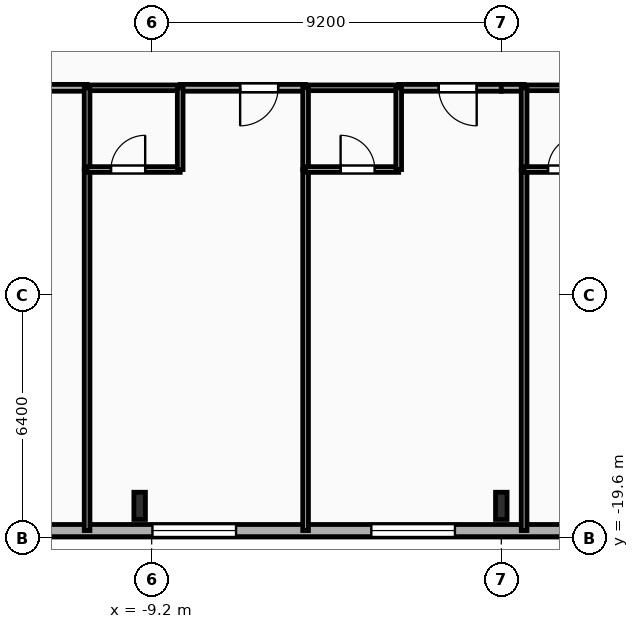
"""IFC4 building model, lengths in metres.
Left out: names, types, materials, properties, quantities, classifications, styles, units other than length and angle.
Written with IfcOpenShell. Run it as: python <this file> out.ifc"""

import sys

from ifc_helpers import new_model, si_unit, direction, frame, frame_2d, origin, origin_2d, place, context, subcontext, project, spatial, rectangle, i_section, extrude, element, fill, save


model = new_model("IFC4")
c1 = context("Model", 3, precision=1e-05, world=origin(), true_north=direction((0.0, 1.0)))
c2 = subcontext(c1, "Body", "Model", "MODEL_VIEW")
j1 = project(units=[si_unit("LENGTHUNIT", "METRE"), si_unit("PLANEANGLEUNIT", "RADIAN")], contexts=[c1])
p1 = place(None, origin())
s1 = spatial("IfcSite", under=j1, at=p1, CompositionType="ELEMENT")
p2 = place(p1, origin())
s2 = spatial("IfcBuilding", under=s1, at=p2, CompositionType="ELEMENT")
p3 = place(p2, frame((0.0, 0.0, 67.2)))
s3 = spatial("IfcBuildingStorey", under=s2, at=p3, CompositionType="ELEMENT", Elevation=67.2)
for number, where, z_axis, x_axis in (
    (1, (-9.517, -18.75, 0.0), (0.0, 0.0, 1.0), (1.0, 0.0, 0.0)),
    (2, (0.0, -18.75, 0.0), (0.0, 0.0, 1.0), (1.0, 0.0, 0.0)),
):
    element("IfcColumn", number, at=place(p3, frame(where, z_axis=z_axis, x_axis=x_axis)), inside=s3, PredefinedType="COLUMN", context=c2, shape_type="SweptSolid", body=[
        extrude(i_section(OverallWidth=0.304, OverallDepth=0.716, WebThickness=0.021, FlangeThickness=0.04, FilletRadius=0.027, at=origin_2d()), origin(), (0.0, 0.0, 1.0), 3.35),
    ])
p4 = place(p3, frame((29.2, -19.4, 0.0), z_axis=(0.0, 0.0, 1.0), x_axis=(-1.0, 0.0, 0.0)))
e3 = element("IfcWall", 3, at=p4, inside=s3, PredefinedType="SOLIDWALL", context=c2, shape_type="SweptSolid", body=[
    extrude(rectangle(XDim=58.4, YDim=0.32, at=frame_2d((29.2, 0.0))), origin(), (0.0, 0.0, 1.0), 3.035),
])
p5 = place(p4, frame((2.535, 0.0, 0.85)))
e4 = element("IfcOpeningElement", 4, at=p5, cuts=e3, PredefinedType="OPENING", context=c2, shape_type="SweptSolid", body=[
    extrude(rectangle(XDim=1.65, YDim=1.85, at=frame_2d((0.825, 0.925))), frame((0.0, 0.17, 0.0), z_axis=(0.0, -1.0, 0.0), x_axis=(1.0, 0.0, 0.0)), (0.0, 0.0, 1.0), 0.34),
])
p6 = place(p4, frame((7.975, 0.0, 0.85)))
e5 = element("IfcOpeningElement", 5, at=p6, cuts=e3, PredefinedType="OPENING", context=c2, shape_type="SweptSolid", body=[
    extrude(rectangle(XDim=1.65, YDim=1.85, at=frame_2d((0.825, 0.925))), frame((0.0, 0.17, 0.0), z_axis=(0.0, -1.0, 0.0), x_axis=(1.0, 0.0, 0.0)), (0.0, 0.0, 1.0), 0.34),
])
p7 = place(p4, frame((13.14, 0.0, 0.85)))
e6 = element("IfcOpeningElement", 6, at=p7, cuts=e3, PredefinedType="OPENING", context=c2, shape_type="SweptSolid", body=[
    extrude(rectangle(XDim=2.2, YDim=1.85, at=frame_2d((1.1, 0.925))), frame((0.0, 0.17, 0.0), z_axis=(0.0, -1.0, 0.0), x_axis=(1.0, 0.0, 0.0)), (0.0, 0.0, 1.0), 0.34),
])
p8 = place(p4, frame((19.992, 0.0, 0.85)))
e7 = element("IfcOpeningElement", 7, at=p8, cuts=e3, PredefinedType="OPENING", context=c2, shape_type="SweptSolid", body=[
    extrude(rectangle(XDim=2.2, YDim=1.85, at=frame_2d((1.1, 0.925))), frame((0.0, 0.17, 0.0), z_axis=(0.0, -1.0, 0.0), x_axis=(1.0, 0.0, 0.0)), (0.0, 0.0, 1.0), 0.34),
])
p9 = place(p4, frame((24.66, 0.0, 0.85)))
e8 = element("IfcOpeningElement", 8, at=p9, cuts=e3, PredefinedType="OPENING", context=c2, shape_type="SweptSolid", body=[
    extrude(rectangle(XDim=2.2, YDim=1.85, at=frame_2d((1.1, 0.925))), frame((0.0, 0.17, 0.0), z_axis=(0.0, -1.0, 0.0), x_axis=(1.0, 0.0, 0.0)), (0.0, 0.0, 1.0), 0.34),
])
p10 = place(p4, frame((30.42, 0.0, 0.85)))
e9 = element("IfcOpeningElement", 9, at=p10, cuts=e3, PredefinedType="OPENING", context=c2, shape_type="SweptSolid", body=[
    extrude(rectangle(XDim=2.2, YDim=1.85, at=frame_2d((1.1, 0.925))), frame((0.0, 0.17, 0.0), z_axis=(0.0, -1.0, 0.0), x_axis=(1.0, 0.0, 0.0)), (0.0, 0.0, 1.0), 0.34),
])
p11 = place(p4, frame((36.18, 0.0, 0.85)))
e10 = element("IfcOpeningElement", 10, at=p11, cuts=e3, PredefinedType="OPENING", context=c2, shape_type="SweptSolid", body=[
    extrude(rectangle(XDim=2.2, YDim=1.85, at=frame_2d((1.1, 0.925))), frame((0.0, 0.17, 0.0), z_axis=(0.0, -1.0, 0.0), x_axis=(1.0, 0.0, 0.0)), (0.0, 0.0, 1.0), 0.34),
])
p12 = place(p4, frame((41.94, 0.0, 0.85)))
e11 = element("IfcOpeningElement", 11, at=p12, cuts=e3, PredefinedType="OPENING", context=c2, shape_type="SweptSolid", body=[
    extrude(rectangle(XDim=2.2, YDim=1.85, at=frame_2d((1.1, 0.925))), frame((0.0, 0.17, 0.0), z_axis=(0.0, -1.0, 0.0), x_axis=(1.0, 0.0, 0.0)), (0.0, 0.0, 1.0), 0.34),
])
p13 = place(p4, frame((48.821, 0.0, 0.85)))
e12 = element("IfcOpeningElement", 12, at=p13, cuts=e3, PredefinedType="OPENING", context=c2, shape_type="SweptSolid", body=[
    extrude(rectangle(XDim=1.65, YDim=1.85, at=frame_2d((0.825, 0.925))), frame((0.0, 0.17, 0.0), z_axis=(0.0, -1.0, 0.0), x_axis=(1.0, 0.0, 0.0)), (0.0, 0.0, 1.0), 0.34),
])
p14 = place(p4, frame((53.775, 0.0, 0.85)))
e13 = element("IfcOpeningElement", 13, at=p14, cuts=e3, PredefinedType="OPENING", context=c2, shape_type="SweptSolid", body=[
    extrude(rectangle(XDim=1.65, YDim=1.85, at=frame_2d((0.825, 0.925))), frame((0.0, 0.17, 0.0), z_axis=(0.0, -1.0, 0.0), x_axis=(1.0, 0.0, 0.0)), (0.0, 0.0, 1.0), 0.34),
])
p15 = place(p3, frame((-10.9, -7.75, 0.0), z_axis=(0.0, 0.0, 1.0), x_axis=(-1.0, 0.0, 0.0)))
e14 = element("IfcWall", 14, at=p15, inside=s3, PredefinedType="PARTITIONING", context=c2, shape_type="SweptSolid", body=[
    extrude(rectangle(XDim=3.3, YDim=0.18, at=frame_2d((1.65, 0.0))), origin(), (0.0, 0.0, 1.0), 3.035),
])
p16 = place(p15, frame((1.577, 0.0, 0.0)))
e15 = element("IfcOpeningElement", 15, at=p16, cuts=e14, PredefinedType="OPENING", context=c2, shape_type="SweptSolid", body=[
    extrude(rectangle(XDim=1.0, YDim=2.15, at=frame_2d((0.5, 1.075))), frame((0.0, 0.1, 0.0), z_axis=(0.0, -1.0, 0.0), x_axis=(1.0, 0.0, 0.0)), (0.0, 0.0, 1.0), 0.2),
])
p17 = place(p3, frame((-5.15, -7.75, 0.0), z_axis=(0.0, 0.0, 1.0), x_axis=(-1.0, 0.0, 0.0)))
e16 = element("IfcWall", 16, at=p17, inside=s3, PredefinedType="PARTITIONING", context=c2, shape_type="SweptSolid", body=[
    extrude(rectangle(XDim=3.3, YDim=0.18, at=frame_2d((1.65, 0.0))), origin(), (0.0, 0.0, 1.0), 3.035),
])
p18 = place(p17, frame((0.722, 0.0, 0.0)))
e17 = element("IfcOpeningElement", 17, at=p18, cuts=e16, PredefinedType="OPENING", context=c2, shape_type="SweptSolid", body=[
    extrude(rectangle(XDim=1.0, YDim=2.15, at=frame_2d((0.5, 1.075))), frame((0.0, 0.1, 0.0), z_axis=(0.0, -1.0, 0.0), x_axis=(1.0, 0.0, 0.0)), (0.0, 0.0, 1.0), 0.2),
])
p19 = place(p3, frame((-8.45, -7.75, 0.0), z_axis=(0.0, 0.0, 1.0), x_axis=(-1.0, 0.0, 0.0)))
e18 = element("IfcWall", 18, at=p19, inside=s3, PredefinedType="PLUMBINGWALL", context=c2, shape_type="SweptSolid", body=[
    extrude(rectangle(XDim=2.45, YDim=0.15, at=frame_2d((1.225, 0.0))), origin(), (0.0, 0.0, 1.0), 3.035),
])
p20 = place(p3, frame((0.0, -7.75, 0.0), z_axis=(0.0, 0.0, 1.0), x_axis=(-1.0, 0.0, 0.0)))
e19 = element("IfcWall", 19, at=p20, inside=s3, PredefinedType="PARTITIONING", context=c2, shape_type="SweptSolid", body=[
    extrude(rectangle(XDim=2.7, YDim=0.18, at=frame_2d((1.35, 0.0))), origin(), (0.0, 0.0, 1.0), 3.035),
])
p21 = place(p20, frame((0.647, 0.0, 0.0)))
e20 = element("IfcOpeningElement", 20, at=p21, cuts=e19, PredefinedType="OPENING", context=c2, shape_type="SweptSolid", body=[
    extrude(rectangle(XDim=1.0, YDim=2.15, at=frame_2d((0.5, 1.075))), frame((0.0, 0.1, 0.0), z_axis=(0.0, -1.0, 0.0), x_axis=(1.0, 0.0, 0.0)), (0.0, 0.0, 1.0), 0.2),
])
p22 = place(p3, frame((-2.7, -7.75, 0.0), z_axis=(0.0, 0.0, 1.0), x_axis=(-1.0, 0.0, 0.0)))
e21 = element("IfcWall", 21, at=p22, inside=s3, PredefinedType="PLUMBINGWALL", context=c2, shape_type="SweptSolid", body=[
    extrude(rectangle(XDim=2.45, YDim=0.15, at=frame_2d((1.225, 0.0))), origin(), (0.0, 0.0, 1.0), 3.035),
])
p23 = place(p3, frame((0.6, -7.75, 0.0), z_axis=(0.0, 0.0, 1.0), x_axis=(-1.0, 0.0, 0.0)))
e22 = element("IfcWall", 22, at=p23, inside=s3, PredefinedType="PARTITIONING", context=c2, shape_type="SweptSolid", body=[
    extrude(rectangle(XDim=0.6, YDim=0.18, at=frame_2d((0.3, 0.0))), origin(), (0.0, 0.0, 1.0), 3.035),
])
p24 = place(p3, frame((3.05, -7.75, 0.0), z_axis=(0.0, 0.0, 1.0), x_axis=(-1.0, 0.0, 0.0)))
e23 = element("IfcWall", 23, at=p24, inside=s3, PredefinedType="PLUMBINGWALL", context=c2, shape_type="SweptSolid", body=[
    extrude(rectangle(XDim=2.45, YDim=0.15, at=frame_2d((1.225, 0.0))), origin(), (0.0, 0.0, 1.0), 3.035),
])
p25 = place(p3, frame((-10.9, -9.9, 0.0), z_axis=(0.0, 0.0, 1.0), x_axis=(0.0, -1.0, 0.0)))
e24 = element("IfcWall", 24, at=p25, inside=s3, PredefinedType="PARTITIONING", context=c2, shape_type="SweptSolid", body=[
    extrude(rectangle(XDim=9.5, YDim=0.15, at=frame_2d((4.75, 0.0))), origin(), (0.0, 0.0, 1.0), 3.035),
])
p26 = place(p3, frame((-10.9, -7.75, 0.0), z_axis=(0.0, 0.0, 1.0), x_axis=(0.0, -1.0, 0.0)))
e25 = element("IfcWall", 25, at=p26, inside=s3, PredefinedType="PLUMBINGWALL", context=c2, shape_type="SweptSolid", body=[
    extrude(rectangle(XDim=2.15, YDim=0.15, at=frame_2d((1.075, 0.0))), origin(), (0.0, 0.0, 1.0), 3.035),
])
p27 = place(p3, frame((-10.9, -9.9, 0.0), z_axis=(0.0, 0.0, 1.0), x_axis=(1.0, 0.0, 0.0)))
e26 = element("IfcWall", 26, at=p27, inside=s3, PredefinedType="PLUMBINGWALL", context=c2, shape_type="SweptSolid", body=[
    extrude(rectangle(XDim=2.45, YDim=0.15, at=frame_2d((1.225, 0.0))), origin(), (0.0, 0.0, 1.0), 3.035),
])
p28 = place(p27, frame((0.629, 0.0, 0.0)))
e27 = element("IfcOpeningElement", 27, at=p28, cuts=e26, PredefinedType="OPENING", context=c2, shape_type="SweptSolid", body=[
    extrude(rectangle(XDim=0.9, YDim=2.1, at=frame_2d((0.45, 1.05))), frame((0.0, 0.085, 0.0), z_axis=(0.0, -1.0, 0.0), x_axis=(1.0, 0.0, 0.0)), (0.0, 0.0, 1.0), 0.17),
])
p29 = place(p3, frame((-8.45, -9.9, 0.0), z_axis=(0.0, 0.0, 1.0), x_axis=(0.0, 1.0, 0.0)))
e28 = element("IfcWall", 28, at=p29, inside=s3, PredefinedType="PLUMBINGWALL", context=c2, shape_type="SweptSolid", body=[
    extrude(rectangle(XDim=2.15, YDim=0.15, at=frame_2d((1.075, 0.0))), origin(), (0.0, 0.0, 1.0), 3.035),
])
p30 = place(p3, frame((-5.15, -9.9, 0.0), z_axis=(0.0, 0.0, 1.0), x_axis=(0.0, -1.0, 0.0)))
e29 = element("IfcWall", 29, at=p30, inside=s3, PredefinedType="PARTITIONING", context=c2, shape_type="SweptSolid", body=[
    extrude(rectangle(XDim=9.5, YDim=0.15, at=frame_2d((4.75, 0.0))), origin(), (0.0, 0.0, 1.0), 3.035),
])
p31 = place(p3, frame((-5.15, -7.75, 0.0), z_axis=(0.0, 0.0, 1.0), x_axis=(0.0, -1.0, 0.0)))
e30 = element("IfcWall", 30, at=p31, inside=s3, PredefinedType="PLUMBINGWALL", context=c2, shape_type="SweptSolid", body=[
    extrude(rectangle(XDim=2.15, YDim=0.15, at=frame_2d((1.075, 0.0))), origin(), (0.0, 0.0, 1.0), 3.035),
])
p32 = place(p3, frame((-5.15, -9.9, 0.0), z_axis=(0.0, 0.0, 1.0), x_axis=(1.0, 0.0, 0.0)))
e31 = element("IfcWall", 31, at=p32, inside=s3, PredefinedType="PLUMBINGWALL", context=c2, shape_type="SweptSolid", body=[
    extrude(rectangle(XDim=2.45, YDim=0.15, at=frame_2d((1.225, 0.0))), origin(), (0.0, 0.0, 1.0), 3.035),
])
p33 = place(p32, frame((0.921, 0.0, 0.0)))
e32 = element("IfcOpeningElement", 32, at=p33, cuts=e31, PredefinedType="OPENING", context=c2, shape_type="SweptSolid", body=[
    extrude(rectangle(XDim=0.9, YDim=2.1, at=frame_2d((0.45, 1.05))), frame((0.0, 0.085, 0.0), z_axis=(0.0, -1.0, 0.0), x_axis=(1.0, 0.0, 0.0)), (0.0, 0.0, 1.0), 0.17),
])
p34 = place(p3, frame((-2.7, -9.9, 0.0), z_axis=(0.0, 0.0, 1.0), x_axis=(0.0, 1.0, 0.0)))
e33 = element("IfcWall", 33, at=p34, inside=s3, PredefinedType="PLUMBINGWALL", context=c2, shape_type="SweptSolid", body=[
    extrude(rectangle(XDim=2.15, YDim=0.15, at=frame_2d((1.075, 0.0))), origin(), (0.0, 0.0, 1.0), 3.035),
])
p35 = place(p3, frame((0.6, -9.9, 0.0), z_axis=(0.0, 0.0, 1.0), x_axis=(0.0, -1.0, 0.0)))
e34 = element("IfcWall", 34, at=p35, inside=s3, PredefinedType="PARTITIONING", context=c2, shape_type="SweptSolid", body=[
    extrude(rectangle(XDim=9.5, YDim=0.15, at=frame_2d((4.75, 0.0))), origin(), (0.0, 0.0, 1.0), 3.035),
])
p36 = place(p3, frame((0.6, -7.75, 0.0), z_axis=(0.0, 0.0, 1.0), x_axis=(0.0, -1.0, 0.0)))
e35 = element("IfcWall", 35, at=p36, inside=s3, PredefinedType="PLUMBINGWALL", context=c2, shape_type="SweptSolid", body=[
    extrude(rectangle(XDim=2.15, YDim=0.15, at=frame_2d((1.075, 0.0))), origin(), (0.0, 0.0, 1.0), 3.035),
])
p37 = place(p3, frame((0.6, -9.9, 0.0), z_axis=(0.0, 0.0, 1.0), x_axis=(1.0, 0.0, 0.0)))
e36 = element("IfcWall", 36, at=p37, inside=s3, PredefinedType="PLUMBINGWALL", context=c2, shape_type="SweptSolid", body=[
    extrude(rectangle(XDim=2.45, YDim=0.15, at=frame_2d((1.225, 0.0))), origin(), (0.0, 0.0, 1.0), 3.035),
])
p38 = place(p37, frame((0.629, 0.0, 0.0)))
e37 = element("IfcOpeningElement", 37, at=p38, cuts=e36, PredefinedType="OPENING", context=c2, shape_type="SweptSolid", body=[
    extrude(rectangle(XDim=0.9, YDim=2.1, at=frame_2d((0.45, 1.05))), frame((0.0, 0.085, 0.0), z_axis=(0.0, -1.0, 0.0), x_axis=(1.0, 0.0, 0.0)), (0.0, 0.0, 1.0), 0.17),
])
p39 = place(p10, origin())
e38 = element("IfcWindow", 38, at=p39, inside=s3, PartitioningType="SINGLE_PANEL", PredefinedType="WINDOW", context=c2, shape_type="SweptSolid", body=[
    extrude(rectangle(XDim=2.2, YDim=1.85, at=frame_2d((1.1, 0.925))), frame((0.0, 0.03, 0.0), z_axis=(0.0, -1.0, 0.0), x_axis=(1.0, 0.0, 0.0)), (0.0, 0.0, 1.0), 0.06),
])
fill(e9, e38)
p40 = place(p11, origin())
e39 = element("IfcWindow", 39, at=p40, inside=s3, PartitioningType="SINGLE_PANEL", PredefinedType="WINDOW", context=c2, shape_type="SweptSolid", body=[
    extrude(rectangle(XDim=2.2, YDim=1.85, at=frame_2d((1.1, 0.925))), frame((0.0, 0.03, 0.0), z_axis=(0.0, -1.0, 0.0), x_axis=(1.0, 0.0, 0.0)), (0.0, 0.0, 1.0), 0.06),
])
fill(e10, e39)
p41 = place(p18, origin())
e40 = element("IfcDoor", 40, at=p41, inside=s3, OperationType="SINGLE_SWING_RIGHT", PredefinedType="DOOR", context=c2, shape_type="SweptSolid", body=[
    extrude(rectangle(XDim=1.0, YDim=2.15, at=frame_2d((0.5, 1.075))), frame((0.0, 0.025, 0.0), z_axis=(0.0, -1.0, 0.0), x_axis=(1.0, 0.0, 0.0)), (0.0, 0.0, 1.0), 0.05),
])
fill(e17, e40)
p42 = place(p21, origin())
e41 = element("IfcDoor", 41, at=p42, inside=s3, OperationType="SINGLE_SWING_LEFT", PredefinedType="DOOR", context=c2, shape_type="SweptSolid", body=[
    extrude(rectangle(XDim=1.0, YDim=2.15, at=frame_2d((0.5, 1.075))), frame((0.0, 0.025, 0.0), z_axis=(0.0, -1.0, 0.0), x_axis=(1.0, 0.0, 0.0)), (0.0, 0.0, 1.0), 0.05),
])
fill(e20, e41)
p43 = place(p28, origin())
e42 = element("IfcDoor", 42, at=p43, inside=s3, OperationType="SINGLE_SWING_RIGHT", PredefinedType="DOOR", context=c2, shape_type="SweptSolid", body=[
    extrude(rectangle(XDim=0.9, YDim=2.1, at=frame_2d((0.45, 1.05))), frame((0.0, 0.025, 0.0), z_axis=(0.0, -1.0, 0.0), x_axis=(1.0, 0.0, 0.0)), (0.0, 0.0, 1.0), 0.05),
])
fill(e27, e42)
p44 = place(p33, origin())
e43 = element("IfcDoor", 43, at=p44, inside=s3, OperationType="SINGLE_SWING_LEFT", PredefinedType="DOOR", context=c2, shape_type="SweptSolid", body=[
    extrude(rectangle(XDim=0.9, YDim=2.1, at=frame_2d((0.45, 1.05))), frame((0.0, 0.025, 0.0), z_axis=(0.0, -1.0, 0.0), x_axis=(1.0, 0.0, 0.0)), (0.0, 0.0, 1.0), 0.05),
])
fill(e32, e43)
p45 = place(p38, origin())
e44 = element("IfcDoor", 44, at=p45, inside=s3, OperationType="SINGLE_SWING_RIGHT", PredefinedType="DOOR", context=c2, shape_type="SweptSolid", body=[
    extrude(rectangle(XDim=0.9, YDim=2.1, at=frame_2d((0.45, 1.05))), frame((0.0, 0.025, 0.0), z_axis=(0.0, -1.0, 0.0), x_axis=(1.0, 0.0, 0.0)), (0.0, 0.0, 1.0), 0.05),
])
fill(e37, e44)
save(model, sys.argv[1])
